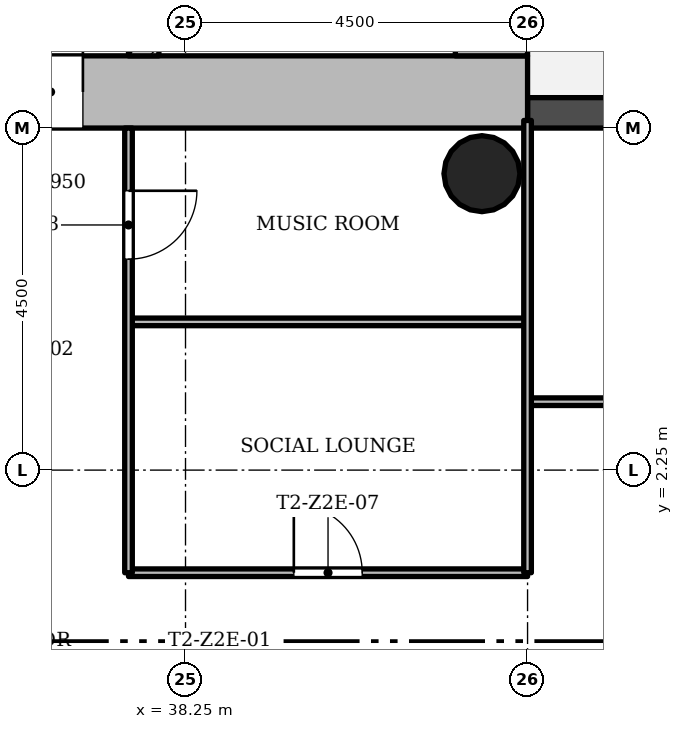
"""IFC4 building model, lengths in metres.
Left out: names, types, materials, properties, quantities, classifications, styles, units other than length and angle.
Written with IfcOpenShell. Run it as: python <this file> out.ifc"""

import sys

from ifc_helpers import new_model, si_unit, direction, frame, frame_2d, origin, origin_2d, place, context, subcontext, project, spatial, rectangle, hollow_circle, extrude, element, fill, save


model = new_model("IFC4")
c1 = context("Model", 3, precision=1e-05, world=origin(), true_north=direction((0.0, 1.0)))
c2 = subcontext(c1, "Body", "Model", "MODEL_VIEW")
j1 = project(units=[si_unit("LENGTHUNIT", "METRE"), si_unit("PLANEANGLEUNIT", "RADIAN")], contexts=[c1])
p1 = place(None, origin())
s1 = spatial("IfcSite", under=j1, at=p1, CompositionType="ELEMENT")
p2 = place(p1, origin())
s2 = spatial("IfcBuilding", under=s1, at=p2, CompositionType="ELEMENT")
p3 = place(p2, frame((0.0, 0.0, 97.0)))
s3 = spatial("IfcBuildingStorey", under=s2, at=p3, CompositionType="ELEMENT", Elevation=97.0)
p4 = place(p3, frame((30.2, 7.225, 0.0), z_axis=(0.0, 0.0, 1.0), x_axis=(1.0, 0.0, 0.0)))
e1 = element("IfcWall", 1, at=p4, inside=s3, PredefinedType="SHEAR", context=c2, shape_type="SweptSolid", body=[
    extrude(rectangle(XDim=12.55, YDim=0.95, at=frame_2d((6.275, 0.0))), origin(), (0.0, 0.0, 1.0), 3.4),
])
p5 = place(p4, frame((4.9, 0.0, 0.0)))
e2 = element("IfcOpeningElement", 2, at=p5, cuts=e1, PredefinedType="OPENING", context=c2, shape_type="SweptSolid", body=[
    extrude(rectangle(XDim=1.8, YDim=2.1, at=frame_2d((0.9, 1.05))), frame((0.0, 0.485, 0.0), z_axis=(0.0, -1.0, 0.0), x_axis=(1.0, 0.0, 0.0)), (0.0, 0.0, 1.0), 0.97),
])
p6 = place(p3, frame((42.275, 7.7, 0.0), z_axis=(0.0, 0.0, 1.0), x_axis=(0.0, 1.0, 0.0)))
e3 = element("IfcWall", 3, at=p6, inside=s3, PredefinedType="SHEAR", context=c2, shape_type="SweptSolid", body=[
    extrude(rectangle(XDim=8.05, YDim=0.95, at=frame_2d((4.025, 0.0))), origin(), (0.0, 0.0, 1.0), 3.4),
])
p7 = place(p3, frame((37.7, 7.7, 0.0), z_axis=(0.0, 0.0, 1.0), x_axis=(0.0, 1.0, 0.0)))
e4 = element("IfcWall", 4, at=p7, inside=s3, PredefinedType="SHEAR", context=c2, shape_type="SweptSolid", body=[
    extrude(rectangle(XDim=7.1, YDim=0.4, at=frame_2d((3.55, 0.0))), origin(), (0.0, 0.0, 1.0), 3.4),
])
p8 = place(p7, frame((0.8, 0.0, 0.0)))
e5 = element("IfcOpeningElement", 5, at=p8, cuts=e4, PredefinedType="OPENING", context=c2, shape_type="SweptSolid", body=[
    extrude(rectangle(XDim=1.1, YDim=2.1, at=frame_2d((0.55, 1.05))), frame((0.0, 0.21, 0.0), z_axis=(0.0, -1.0, 0.0), x_axis=(1.0, 0.0, 0.0)), (0.0, 0.0, 1.0), 0.42),
])
p9 = place(p7, frame((3.0, 0.0, 0.0)))
e6 = element("IfcOpeningElement", 6, at=p9, cuts=e4, PredefinedType="OPENING", context=c2, shape_type="SweptSolid", body=[
    extrude(rectangle(XDim=1.1, YDim=2.1, at=frame_2d((0.55, 1.05))), frame((0.0, 0.21, 0.0), z_axis=(0.0, -1.0, 0.0), x_axis=(1.0, 0.0, 0.0)), (0.0, 0.0, 1.0), 0.42),
])
p10 = place(p7, frame((5.2, 0.0, 0.0)))
e7 = element("IfcOpeningElement", 7, at=p10, cuts=e4, PredefinedType="OPENING", context=c2, shape_type="SweptSolid", body=[
    extrude(rectangle(XDim=1.1, YDim=2.1, at=frame_2d((0.55, 1.05))), frame((0.0, 0.21, 0.0), z_axis=(0.0, -1.0, 0.0), x_axis=(1.0, 0.0, 0.0)), (0.0, 0.0, 1.0), 0.42),
])
p11 = place(p3, frame((42.15, 6.15, 0.0), z_axis=(0.0, 0.0, 1.0), x_axis=(1.0, 0.0, 0.0)))
e8 = element("IfcColumn", 8, at=p11, inside=s3, PredefinedType="COLUMN", context=c2, shape_type="SweptSolid", body=[
    extrude(hollow_circle(Radius=0.5, WallThickness=0.036, at=origin_2d()), origin(), (0.0, 0.0, 1.0), 3.4),
])
p12 = place(p3, frame((47.25, 6.95, -0.02), z_axis=(0.0, 0.0, 1.0), x_axis=(-1.0, 0.0, 0.0)))
e9 = element("IfcWall", 9, at=p12, inside=s3, PredefinedType="STANDARD", context=c2, shape_type="SweptSolid", body=[
    extrude(rectangle(XDim=4.5, YDim=0.4, at=frame_2d((2.25, 0.0))), origin(), (0.0, 0.0, 1.0), 3.12),
])
p13 = place(p12, frame((1.35, 0.0, 0.02)))
e10 = element("IfcOpeningElement", 10, at=p13, cuts=e9, PredefinedType="OPENING", context=c2, shape_type="SweptSolid", body=[
    extrude(rectangle(XDim=1.8, YDim=2.1, at=frame_2d((0.9, 1.05))), frame((0.0, 0.21, 0.0), z_axis=(0.0, -1.0, 0.0), x_axis=(1.0, 0.0, 0.0)), (0.0, 0.0, 1.0), 0.42),
])
p14 = place(p3, frame((42.75, 0.9, 0.0), z_axis=(0.0, 0.0, 1.0), x_axis=(-1.0, 0.0, 0.0)))
e11 = element("IfcWall", 11, at=p14, inside=s3, PredefinedType="PARTITIONING", context=c2, shape_type="SweptSolid", body=[
    extrude(rectangle(XDim=5.25, YDim=0.1, at=frame_2d((2.625, 0.0))), origin(), (0.0, 0.0, 1.0), 3.0),
])
p15 = place(p14, frame((2.175, 0.0, 0.0)))
e12 = element("IfcOpeningElement", 12, at=p15, cuts=e11, PredefinedType="OPENING", context=c2, shape_type="SweptSolid", body=[
    extrude(rectangle(XDim=0.9, YDim=2.1, at=frame_2d((0.45, 1.05))), frame((0.0, 0.06, 0.0), z_axis=(0.0, -1.0, 0.0), x_axis=(1.0, 0.0, 0.0)), (0.0, 0.0, 1.0), 0.12),
])
p16 = place(p3, frame((51.75, 3.15, 0.0), z_axis=(0.0, 0.0, 1.0), x_axis=(-1.0, 0.0, 0.0)))
e13 = element("IfcWall", 13, at=p16, inside=s3, PredefinedType="PARTITIONING", context=c2, shape_type="SweptSolid", body=[
    extrude(rectangle(XDim=9.0, YDim=0.1, at=frame_2d((4.5, 0.0))), origin(), (0.0, 0.0, 1.0), 3.0),
])
p17 = place(p16, frame((5.55, 0.0, 0.0)))
e14 = element("IfcOpeningElement", 14, at=p17, cuts=e13, PredefinedType="OPENING", context=c2, shape_type="SweptSolid", body=[
    extrude(rectangle(XDim=0.9, YDim=2.1, at=frame_2d((0.45, 1.05))), frame((0.0, 0.06, 0.0), z_axis=(0.0, -1.0, 0.0), x_axis=(1.0, 0.0, 0.0)), (0.0, 0.0, 1.0), 0.12),
])
p18 = place(p3, frame((42.75, 4.2, 0.0), z_axis=(0.0, 0.0, 1.0), x_axis=(-1.0, 0.0, 0.0)))
e15 = element("IfcWall", 15, at=p18, inside=s3, PredefinedType="PARTITIONING", context=c2, shape_type="SweptSolid", body=[
    extrude(rectangle(XDim=5.25, YDim=0.1, at=frame_2d((2.625, 0.0))), origin(), (0.0, 0.0, 1.0), 3.0),
])
p19 = place(p3, frame((42.75, 0.9, 0.0), z_axis=(0.0, 0.0, 1.0), x_axis=(0.0, 1.0, 0.0)))
e16 = element("IfcWall", 16, at=p19, inside=s3, PredefinedType="PARTITIONING", context=c2, shape_type="SweptSolid", body=[
    extrude(rectangle(XDim=5.95, YDim=0.1, at=frame_2d((2.975, 0.0))), origin(), (0.0, 0.0, 1.0), 3.0),
])
p20 = place(p3, frame((37.5, 0.9, 0.0), z_axis=(0.0, 0.0, 1.0), x_axis=(0.0, 1.0, 0.0)))
e17 = element("IfcWall", 17, at=p20, inside=s3, PredefinedType="PARTITIONING", context=c2, shape_type="SweptSolid", body=[
    extrude(rectangle(XDim=5.85, YDim=0.1, at=frame_2d((2.925, 0.0))), origin(), (0.0, 0.0, 1.0), 3.0),
])
p21 = place(p20, frame((4.125, 0.0, 0.0)))
e18 = element("IfcOpeningElement", 18, at=p21, cuts=e17, PredefinedType="OPENING", context=c2, shape_type="SweptSolid", body=[
    extrude(rectangle(XDim=0.9, YDim=2.1, at=frame_2d((0.45, 1.05))), frame((0.0, 0.06, 0.0), z_axis=(0.0, -1.0, 0.0), x_axis=(1.0, 0.0, 0.0)), (0.0, 0.0, 1.0), 0.12),
])
p22 = place(p15, origin())
e19 = element("IfcDoor", 19, at=p22, inside=s3, OperationType="SINGLE_SWING_RIGHT", PredefinedType="DOOR", context=c2, shape_type="SweptSolid", body=[
    extrude(rectangle(XDim=0.9, YDim=2.1, at=frame_2d((0.45, 1.05))), frame((0.0, 0.025, 0.0), z_axis=(0.0, -1.0, 0.0), x_axis=(1.0, 0.0, 0.0)), (0.0, 0.0, 1.0), 0.05),
])
fill(e12, e19)
p23 = place(p21, origin())
e20 = element("IfcDoor", 20, at=p23, inside=s3, OperationType="SINGLE_SWING_RIGHT", PredefinedType="DOOR", context=c2, shape_type="SweptSolid", body=[
    extrude(rectangle(XDim=0.9, YDim=2.1, at=frame_2d((0.45, 1.05))), frame((0.0, 0.025, 0.0), z_axis=(0.0, -1.0, 0.0), x_axis=(1.0, 0.0, 0.0)), (0.0, 0.0, 1.0), 0.05),
])
fill(e18, e20)
p24 = place(p5, origin())
e21 = element("IfcDoor", 21, at=p24, inside=s3, OperationType="SINGLE_SWING_LEFT", PredefinedType="DOOR", context=c2, shape_type="SweptSolid", body=[
    extrude(rectangle(XDim=1.8, YDim=2.1, at=frame_2d((0.9, 1.05))), frame((0.0, 0.025, 0.0), z_axis=(0.0, -1.0, 0.0), x_axis=(1.0, 0.0, 0.0)), (0.0, 0.0, 1.0), 0.05),
])
fill(e2, e21)
save(model, sys.argv[1])
